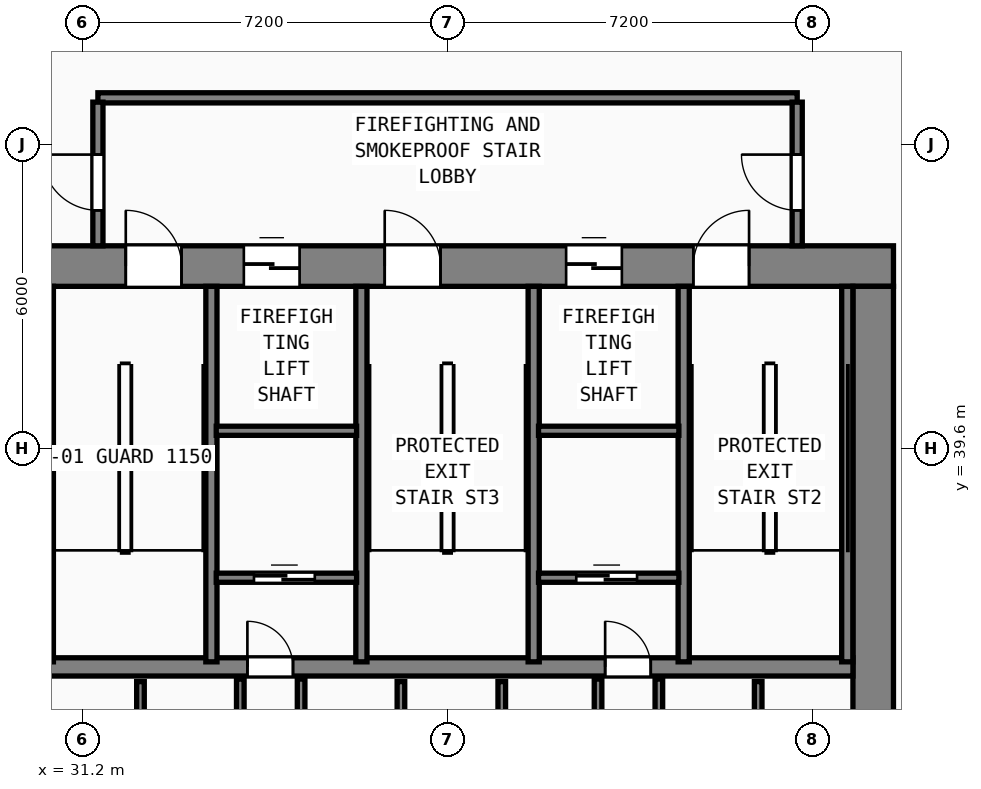
"""IFC4 building model, lengths in metres.
Left out: names, types, materials, properties, quantities, classifications, styles, units other than length and angle.
Written with IfcOpenShell. Run it as: python <this file> out.ifc"""

import sys

from ifc_helpers import new_model, si_unit, direction, frame, frame_2d, origin, place, context, subcontext, project, spatial, rectangle, extrude, element, fill, save


model = new_model("IFC4")
c1 = context("Model", 3, precision=1e-05, world=origin(), true_north=direction((0.0, 1.0)))
c2 = subcontext(c1, "Body", "Model", "MODEL_VIEW")
j1 = project(units=[si_unit("LENGTHUNIT", "METRE"), si_unit("PLANEANGLEUNIT", "RADIAN")], contexts=[c1])
p1 = place(None, origin())
s1 = spatial("IfcSite", under=j1, at=p1, CompositionType="ELEMENT")
p2 = place(p1, origin())
s2 = spatial("IfcBuilding", under=s1, at=p2, CompositionType="ELEMENT")
p3 = place(p2, frame((0.0, 0.0, 5.4)))
s3 = spatial("IfcBuildingStorey", under=s2, at=p3, CompositionType="ELEMENT", Elevation=5.4)
p4 = place(p3, frame((29.6, 43.2, 0.0), z_axis=(0.0, 0.0, 1.0), x_axis=(1.0, 0.0, 0.0)))
e1 = element("IfcWall", 1, at=p4, inside=s3, PredefinedType="SHEAR", context=c2, shape_type="SweptSolid", body=[
    extrude(rectangle(XDim=17.6, YDim=0.8, at=frame_2d((8.8, 0.0))), origin(), (0.0, 0.0, 1.0), 4.56),
])
p5 = place(p4, frame((2.45, 0.0, 0.0)))
e2 = element("IfcOpeningElement", 2, at=p5, cuts=e1, PredefinedType="OPENING", context=c2, shape_type="SweptSolid", body=[
    extrude(rectangle(XDim=1.1, YDim=2.15, at=frame_2d((0.55, 1.075))), frame((0.0, 0.41, 0.0), z_axis=(0.0, -1.0, 0.0), x_axis=(1.0, 0.0, 0.0)), (0.0, 0.0, 1.0), 0.82),
])
p6 = place(p4, frame((7.56, 0.0, 0.0)))
e3 = element("IfcOpeningElement", 3, at=p6, cuts=e1, PredefinedType="OPENING", context=c2, shape_type="SweptSolid", body=[
    extrude(rectangle(XDim=1.1, YDim=2.15, at=frame_2d((0.55, 1.075))), frame((0.0, 0.41, 0.0), z_axis=(0.0, -1.0, 0.0), x_axis=(1.0, 0.0, 0.0)), (0.0, 0.0, 1.0), 0.82),
])
p7 = place(p4, frame((13.65, 0.0, 0.0)))
e4 = element("IfcOpeningElement", 4, at=p7, cuts=e1, PredefinedType="OPENING", context=c2, shape_type="SweptSolid", body=[
    extrude(rectangle(XDim=1.1, YDim=2.15, at=frame_2d((0.55, 1.075))), frame((0.0, 0.41, 0.0), z_axis=(0.0, -1.0, 0.0), x_axis=(1.0, 0.0, 0.0)), (0.0, 0.0, 1.0), 0.82),
])
p8 = place(p4, frame((4.78, 0.0, 0.0)))
e5 = element("IfcOpeningElement", 5, at=p8, cuts=e1, PredefinedType="OPENING", context=c2, shape_type="SweptSolid", body=[
    extrude(rectangle(XDim=1.1, YDim=2.2, at=frame_2d((0.55, 1.1))), frame((0.0, 0.41, 0.0), z_axis=(0.0, -1.0, 0.0), x_axis=(1.0, 0.0, 0.0)), (0.0, 0.0, 1.0), 0.82),
])
p9 = place(p4, frame((11.14, 0.0, 0.0)))
e6 = element("IfcOpeningElement", 6, at=p9, cuts=e1, PredefinedType="OPENING", context=c2, shape_type="SweptSolid", body=[
    extrude(rectangle(XDim=1.1, YDim=2.2, at=frame_2d((0.55, 1.1))), frame((0.0, 0.41, 0.0), z_axis=(0.0, -1.0, 0.0), x_axis=(1.0, 0.0, 0.0)), (0.0, 0.0, 1.0), 0.82),
])
p10 = place(p3, frame((46.8, 32.8, 0.0), z_axis=(0.0, 0.0, 1.0), x_axis=(0.0, 1.0, 0.0)))
e7 = element("IfcWall", 7, at=p10, inside=s3, PredefinedType="SHEAR", context=c2, shape_type="SweptSolid", body=[
    extrude(rectangle(XDim=10.0, YDim=0.8, at=frame_2d((5.0, 0.0))), origin(), (0.0, 0.0, 1.0), 4.56),
])
p11 = place(p3, frame((30.4, 35.29, 0.0), z_axis=(0.0, 0.0, 1.0), x_axis=(1.0, 0.0, 0.0)))
e8 = element("IfcWall", 8, at=p11, inside=s3, PredefinedType="SHEAR", context=c2, shape_type="SweptSolid", body=[
    extrude(rectangle(XDim=16.0, YDim=0.36, at=frame_2d((8.0, 0.0))), origin(), (0.0, 0.0, 1.0), 4.56),
])
p12 = place(p11, frame((4.95, 0.0, 0.0), z_axis=(0.0, 0.0, 1.0), x_axis=(-1.0, 0.0, 0.0)))
e9 = element("IfcOpeningElement", 9, at=p12, cuts=e8, PredefinedType="OPENING", context=c2, shape_type="SweptSolid", body=[
    extrude(rectangle(XDim=0.9, YDim=2.1, at=frame_2d((0.45, 1.05))), frame((0.0, 0.19, 0.0), z_axis=(0.0, -1.0, 0.0), x_axis=(1.0, 0.0, 0.0)), (0.0, 0.0, 1.0), 0.38),
])
p13 = place(p11, frame((12.01, 0.0, 0.0), z_axis=(0.0, 0.0, 1.0), x_axis=(-1.0, 0.0, 0.0)))
e10 = element("IfcOpeningElement", 10, at=p13, cuts=e8, PredefinedType="OPENING", context=c2, shape_type="SweptSolid", body=[
    extrude(rectangle(XDim=0.9, YDim=2.1, at=frame_2d((0.45, 1.05))), frame((0.0, 0.19, 0.0), z_axis=(0.0, -1.0, 0.0), x_axis=(1.0, 0.0, 0.0)), (0.0, 0.0, 1.0), 0.38),
])
for number, where, z_axis, x_axis in (
    (11, (30.512, 35.39, 0.0), (0.0, 0.0, 1.0), (0.0, 1.0, 0.0)),
    (12, (33.74, 35.39, 0.0), (0.0, 0.0, 1.0), (0.0, 1.0, 0.0)),
    (13, (36.7, 35.39, 0.0), (0.0, 0.0, 1.0), (0.0, 1.0, 0.0)),
    (14, (40.1, 35.39, 0.0), (0.0, 0.0, 1.0), (0.0, 1.0, 0.0)),
    (15, (43.06, 35.39, 0.0), (0.0, 0.0, 1.0), (0.0, 1.0, 0.0)),
    (16, (46.288, 35.39, 0.0), (0.0, 0.0, 1.0), (0.0, 1.0, 0.0)),
):
    element("IfcWall", number, at=place(p3, frame(where, z_axis=z_axis, x_axis=x_axis)), inside=s3, PredefinedType="SHEAR", context=c2, shape_type="SweptSolid", body=[
        extrude(rectangle(XDim=7.41, YDim=0.22, at=frame_2d((3.705, 0.0))), origin(), (0.0, 0.0, 1.0), 4.56),
    ])
p14 = place(p3, frame((31.5, 46.52, 0.0), z_axis=(0.0, 0.0, 1.0), x_axis=(1.0, 0.0, 0.0)))
e17 = element("IfcWall", 17, at=p14, inside=s3, PredefinedType="SOLIDWALL", context=c2, shape_type="SweptSolid", body=[
    extrude(rectangle(XDim=13.8, YDim=0.2, at=frame_2d((6.9, 0.0))), origin(), (0.0, 0.0, 1.0), 4.56),
])
p15 = place(p3, frame((31.5, 43.6, 0.0), z_axis=(0.0, 0.0, 1.0), x_axis=(0.0, 1.0, 0.0)))
e18 = element("IfcWall", 18, at=p15, inside=s3, PredefinedType="SOLIDWALL", context=c2, shape_type="SweptSolid", body=[
    extrude(rectangle(XDim=2.835, YDim=0.2, at=frame_2d((1.417, 0.0))), origin(), (0.0, 0.0, 1.0), 4.56),
])
p16 = place(p15, frame((1.8, 0.0, 0.0), z_axis=(0.0, 0.0, 1.0), x_axis=(-1.0, 0.0, 0.0)))
e19 = element("IfcOpeningElement", 19, at=p16, cuts=e18, PredefinedType="OPENING", context=c2, shape_type="SweptSolid", body=[
    extrude(rectangle(XDim=1.1, YDim=2.15, at=frame_2d((0.55, 1.075))), frame((0.0, 0.11, 0.0), z_axis=(0.0, -1.0, 0.0), x_axis=(1.0, 0.0, 0.0)), (0.0, 0.0, 1.0), 0.22),
])
p17 = place(p3, frame((45.3, 43.6, 0.0), z_axis=(0.0, 0.0, 1.0), x_axis=(0.0, 1.0, 0.0)))
e20 = element("IfcWall", 20, at=p17, inside=s3, PredefinedType="SOLIDWALL", context=c2, shape_type="SweptSolid", body=[
    extrude(rectangle(XDim=2.835, YDim=0.2, at=frame_2d((1.417, 0.0))), origin(), (0.0, 0.0, 1.0), 4.56),
])
p18 = place(p17, frame((0.7, 0.0, 0.0)))
e21 = element("IfcOpeningElement", 21, at=p18, cuts=e20, PredefinedType="OPENING", context=c2, shape_type="SweptSolid", body=[
    extrude(rectangle(XDim=1.1, YDim=2.15, at=frame_2d((0.55, 1.075))), frame((0.0, 0.11, 0.0), z_axis=(0.0, -1.0, 0.0), x_axis=(1.0, 0.0, 0.0)), (0.0, 0.0, 1.0), 0.22),
])
for number, where, z_axis, x_axis in (
    (22, (33.835, 39.95, 0.0), (0.0, 0.0, 1.0), (1.0, 0.0, 0.0)),
    (23, (40.195, 39.95, 0.0), (0.0, 0.0, 1.0), (1.0, 0.0, 0.0)),
):
    element("IfcWall", number, at=place(p3, frame(where, z_axis=z_axis, x_axis=x_axis)), inside=s3, PredefinedType="SOLIDWALL", context=c2, shape_type="SweptSolid", body=[
        extrude(rectangle(XDim=2.77, YDim=0.18, at=frame_2d((1.385, 0.0))), origin(), (0.0, 0.0, 1.0), 4.56),
    ])
p19 = place(p3, frame((33.835, 37.05, 0.0), z_axis=(0.0, 0.0, 1.0), x_axis=(1.0, 0.0, 0.0)))
e24 = element("IfcWall", 24, at=p19, inside=s3, PredefinedType="SOLIDWALL", context=c2, shape_type="SweptSolid", body=[
    extrude(rectangle(XDim=2.77, YDim=0.18, at=frame_2d((1.385, 0.0))), origin(), (0.0, 0.0, 1.0), 4.56),
])
p20 = place(p19, frame((1.945, 0.0, 0.0), z_axis=(0.0, 0.0, 1.0), x_axis=(-1.0, 0.0, 0.0)))
e25 = element("IfcOpeningElement", 25, at=p20, cuts=e24, PredefinedType="OPENING", context=c2, shape_type="SweptSolid", body=[
    extrude(rectangle(XDim=1.2, YDim=2.2, at=frame_2d((0.6, 1.1))), frame((0.0, 0.1, 0.0), z_axis=(0.0, -1.0, 0.0), x_axis=(1.0, 0.0, 0.0)), (0.0, 0.0, 1.0), 0.2),
])
for number, where, z_axis, x_axis in (
    (26, (34.31, 32.88, 0.0), (0.0, 0.0, 1.0), (0.0, 1.0, 0.0)),
    (27, (35.51, 32.88, 0.0), (0.0, 0.0, 1.0), (0.0, 1.0, 0.0)),
):
    element("IfcWall", number, at=place(p3, frame(where, z_axis=z_axis, x_axis=x_axis)), inside=s3, PredefinedType="SOLIDWALL", context=c2, shape_type="SweptSolid", body=[
        extrude(rectangle(XDim=2.17, YDim=0.15, at=frame_2d((1.085, 0.0))), origin(), (0.0, 0.0, 1.0), 4.56),
    ])
p21 = place(p3, frame((40.195, 37.05, 0.0), z_axis=(0.0, 0.0, 1.0), x_axis=(1.0, 0.0, 0.0)))
e28 = element("IfcWall", 28, at=p21, inside=s3, PredefinedType="SOLIDWALL", context=c2, shape_type="SweptSolid", body=[
    extrude(rectangle(XDim=2.77, YDim=0.18, at=frame_2d((1.385, 0.0))), origin(), (0.0, 0.0, 1.0), 4.56),
])
p22 = place(p21, frame((1.945, 0.0, 0.0), z_axis=(0.0, 0.0, 1.0), x_axis=(-1.0, 0.0, 0.0)))
e29 = element("IfcOpeningElement", 29, at=p22, cuts=e28, PredefinedType="OPENING", context=c2, shape_type="SweptSolid", body=[
    extrude(rectangle(XDim=1.2, YDim=2.2, at=frame_2d((0.6, 1.1))), frame((0.0, 0.1, 0.0), z_axis=(0.0, -1.0, 0.0), x_axis=(1.0, 0.0, 0.0)), (0.0, 0.0, 1.0), 0.2),
])
for number, where, z_axis, x_axis in (
    (30, (41.37, 32.88, 0.0), (0.0, 0.0, 1.0), (0.0, 1.0, 0.0)),
    (31, (42.57, 32.88, 0.0), (0.0, 0.0, 1.0), (0.0, 1.0, 0.0)),
):
    element("IfcWall", number, at=place(p3, frame(where, z_axis=z_axis, x_axis=x_axis)), inside=s3, PredefinedType="SOLIDWALL", context=c2, shape_type="SweptSolid", body=[
        extrude(rectangle(XDim=2.17, YDim=0.15, at=frame_2d((1.085, 0.0))), origin(), (0.0, 0.0, 1.0), 4.56),
    ])
for number, where, z_axis, x_axis in (
    (32, (32.34, 32.95, 0.0), (0.0, 0.0, 1.0), (0.0, 1.0, 0.0)),
    (33, (37.48, 32.95, 0.0), (0.0, 0.0, 1.0), (0.0, 1.0, 0.0)),
    (34, (39.47, 32.95, 0.0), (0.0, 0.0, 1.0), (0.0, 1.0, 0.0)),
    (35, (44.53, 32.95, 0.0), (0.0, 0.0, 1.0), (0.0, 1.0, 0.0)),
):
    element("IfcWall", number, at=place(p3, frame(where, z_axis=z_axis, x_axis=x_axis)), inside=s3, PredefinedType="SOLIDWALL", context=c2, shape_type="SweptSolid", body=[
        extrude(rectangle(XDim=2.05, YDim=0.15, at=frame_2d((1.025, 0.0))), origin(), (0.0, 0.0, 1.0), 4.56),
    ])
p23 = place(p5, origin())
e36 = element("IfcDoor", 36, at=p23, inside=s3, OperationType="SINGLE_SWING_LEFT", PredefinedType="DOOR", context=c2, shape_type="SweptSolid", body=[
    extrude(rectangle(XDim=1.1, YDim=2.15, at=frame_2d((0.55, 1.075))), frame((0.0, 0.185, 0.0), z_axis=(0.0, -1.0, 0.0), x_axis=(1.0, 0.0, 0.0)), (0.0, 0.0, 1.0), 0.05),
])
fill(e2, e36)
p24 = place(p6, origin())
e37 = element("IfcDoor", 37, at=p24, inside=s3, OperationType="SINGLE_SWING_LEFT", PredefinedType="DOOR", context=c2, shape_type="SweptSolid", body=[
    extrude(rectangle(XDim=1.1, YDim=2.15, at=frame_2d((0.55, 1.075))), frame((0.0, 0.185, 0.0), z_axis=(0.0, -1.0, 0.0), x_axis=(1.0, 0.0, 0.0)), (0.0, 0.0, 1.0), 0.05),
])
fill(e3, e37)
p25 = place(p7, origin())
e38 = element("IfcDoor", 38, at=p25, inside=s3, OperationType="SINGLE_SWING_RIGHT", PredefinedType="DOOR", context=c2, shape_type="SweptSolid", body=[
    extrude(rectangle(XDim=1.1, YDim=2.15, at=frame_2d((0.55, 1.075))), frame((0.0, 0.185, 0.0), z_axis=(0.0, -1.0, 0.0), x_axis=(1.0, 0.0, 0.0)), (0.0, 0.0, 1.0), 0.05),
])
fill(e4, e38)
p26 = place(p16, origin())
e39 = element("IfcDoor", 39, at=p26, inside=s3, OperationType="SINGLE_SWING_LEFT", PredefinedType="DOOR", context=c2, shape_type="SweptSolid", body=[
    extrude(rectangle(XDim=1.1, YDim=2.15, at=frame_2d((0.55, 1.075))), frame((0.0, 0.025, 0.0), z_axis=(0.0, -1.0, 0.0), x_axis=(1.0, 0.0, 0.0)), (0.0, 0.0, 1.0), 0.05),
])
fill(e19, e39)
p27 = place(p18, origin())
e40 = element("IfcDoor", 40, at=p27, inside=s3, OperationType="SINGLE_SWING_RIGHT", PredefinedType="DOOR", context=c2, shape_type="SweptSolid", body=[
    extrude(rectangle(XDim=1.1, YDim=2.15, at=frame_2d((0.55, 1.075))), frame((0.0, 0.025, 0.0), z_axis=(0.0, -1.0, 0.0), x_axis=(1.0, 0.0, 0.0)), (0.0, 0.0, 1.0), 0.05),
])
fill(e21, e40)
p28 = place(p8, origin())
e41 = element("IfcDoor", 41, at=p28, inside=s3, OperationType="SLIDING_TO_LEFT", PredefinedType="DOOR", context=c2, shape_type="SweptSolid", body=[
    extrude(rectangle(XDim=1.1, YDim=2.2, at=frame_2d((0.55, 1.1))), frame((0.0, 0.185, 0.0), z_axis=(0.0, -1.0, 0.0), x_axis=(1.0, 0.0, 0.0)), (0.0, 0.0, 1.0), 0.05),
])
fill(e5, e41)
p29 = place(p9, origin())
e42 = element("IfcDoor", 42, at=p29, inside=s3, OperationType="SLIDING_TO_LEFT", PredefinedType="DOOR", context=c2, shape_type="SweptSolid", body=[
    extrude(rectangle(XDim=1.1, YDim=2.2, at=frame_2d((0.55, 1.1))), frame((0.0, 0.185, 0.0), z_axis=(0.0, -1.0, 0.0), x_axis=(1.0, 0.0, 0.0)), (0.0, 0.0, 1.0), 0.05),
])
fill(e6, e42)
p30 = place(p20, origin())
e43 = element("IfcDoor", 43, at=p30, inside=s3, OperationType="SLIDING_TO_RIGHT", PredefinedType="DOOR", context=c2, shape_type="SweptSolid", body=[
    extrude(rectangle(XDim=1.2, YDim=2.2, at=frame_2d((0.6, 1.1))), frame((0.0, 0.025, 0.0), z_axis=(0.0, -1.0, 0.0), x_axis=(1.0, 0.0, 0.0)), (0.0, 0.0, 1.0), 0.05),
])
fill(e25, e43)
p31 = place(p12, origin())
e44 = element("IfcDoor", 44, at=p31, inside=s3, OperationType="SINGLE_SWING_RIGHT", PredefinedType="DOOR", context=c2, shape_type="SweptSolid", body=[
    extrude(rectangle(XDim=0.9, YDim=2.1, at=frame_2d((0.45, 1.05))), frame((0.0, 0.025, 0.0), z_axis=(0.0, -1.0, 0.0), x_axis=(1.0, 0.0, 0.0)), (0.0, 0.0, 1.0), 0.05),
])
fill(e9, e44)
p32 = place(p22, origin())
e45 = element("IfcDoor", 45, at=p32, inside=s3, OperationType="SLIDING_TO_RIGHT", PredefinedType="DOOR", context=c2, shape_type="SweptSolid", body=[
    extrude(rectangle(XDim=1.2, YDim=2.2, at=frame_2d((0.6, 1.1))), frame((0.0, 0.025, 0.0), z_axis=(0.0, -1.0, 0.0), x_axis=(1.0, 0.0, 0.0)), (0.0, 0.0, 1.0), 0.05),
])
fill(e29, e45)
p33 = place(p13, origin())
e46 = element("IfcDoor", 46, at=p33, inside=s3, OperationType="SINGLE_SWING_RIGHT", PredefinedType="DOOR", context=c2, shape_type="SweptSolid", body=[
    extrude(rectangle(XDim=0.9, YDim=2.1, at=frame_2d((0.45, 1.05))), frame((0.0, 0.025, 0.0), z_axis=(0.0, -1.0, 0.0), x_axis=(1.0, 0.0, 0.0)), (0.0, 0.0, 1.0), 0.05),
])
fill(e10, e46)
save(model, sys.argv[1])
